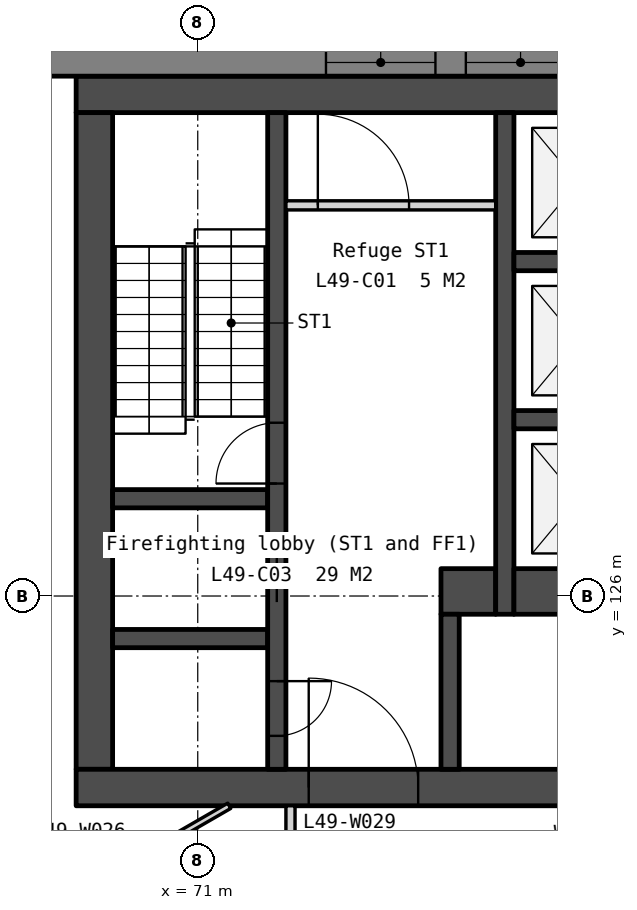
"""IFC4 building model, lengths in metres.
Left out: names, types, materials, properties, quantities, classifications, styles, units other than length and angle.
Written with IfcOpenShell. Run it as: python <this file> out.ifc"""

import sys

from ifc_helpers import new_model, si_unit, direction, frame, frame_2d, origin, place, context, subcontext, project, spatial, polyline, rectangle, outline, extrude, element, fill, save


model = new_model("IFC4")
c1 = context("Model", 3, precision=1e-05, world=origin(), true_north=direction((0.0, 1.0)))
c2 = subcontext(c1, "Body", "Model", "MODEL_VIEW")
j1 = project(units=[si_unit("LENGTHUNIT", "METRE"), si_unit("PLANEANGLEUNIT", "RADIAN")], contexts=[c1])
p1 = place(None, origin())
s1 = spatial("IfcSite", under=j1, at=p1, CompositionType="ELEMENT")
p2 = place(p1, origin())
s2 = spatial("IfcBuilding", under=s1, at=p2, CompositionType="ELEMENT")
p3 = place(p2, frame((0.0, 0.0, 195.8)))
s3 = spatial("IfcBuildingStorey", under=s2, at=p3, CompositionType="ELEMENT", Elevation=195.8)
p4 = place(p3, frame((69.0, 134.25, 0.0), z_axis=(0.0, 0.0, 1.0), x_axis=(1.0, 0.0, 0.0)))
e1 = element("IfcWall", 1, at=p4, inside=s3, PredefinedType="SOLIDWALL", context=c2, shape_type="SweptSolid", body=[
    extrude(rectangle(XDim=22.0, YDim=0.6, at=frame_2d((11.0, 0.0))), origin(), (0.0, 0.0, 1.0), 3.75),
])
p5 = place(p3, frame((69.3, 133.95, 0.0), z_axis=(0.0, 0.0, 1.0), x_axis=(0.0, -1.0, 0.0)))
e2 = element("IfcWall", 2, at=p5, inside=s3, PredefinedType="SOLIDWALL", context=c2, shape_type="SweptSolid", body=[
    extrude(rectangle(XDim=10.8, YDim=0.6, at=frame_2d((5.4, 0.0))), origin(), (0.0, 0.0, 1.0), 3.75),
])
p6 = place(p3, frame((69.0, 122.85, 0.0), z_axis=(0.0, 0.0, 1.0), x_axis=(1.0, 0.0, 0.0)))
e3 = element("IfcWall", 3, at=p6, inside=s3, PredefinedType="SOLIDWALL", context=c2, shape_type="SweptSolid", body=[
    extrude(rectangle(XDim=22.0, YDim=0.6, at=frame_2d((11.0, 0.0))), origin(), (0.0, 0.0, 1.0), 3.75),
])
p7 = place(p6, frame((16.375, 0.0, 0.0)))
e4 = element("IfcOpeningElement", 4, at=p7, cuts=e3, PredefinedType="OPENING", context=c2, shape_type="SweptSolid", body=[
    extrude(rectangle(XDim=1.8, YDim=2.1, at=frame_2d((0.9, 1.05))), frame((0.0, 0.31, 0.0), z_axis=(0.0, -1.0, 0.0), x_axis=(1.0, 0.0, 0.0)), (0.0, 0.0, 1.0), 0.62),
])
p8 = place(p6, frame((3.825, 0.0, 0.0)))
e5 = element("IfcOpeningElement", 5, at=p8, cuts=e3, PredefinedType="OPENING", context=c2, shape_type="SweptSolid", body=[
    extrude(rectangle(XDim=1.8, YDim=2.1, at=frame_2d((0.9, 1.05))), frame((0.0, 0.31, 0.0), z_axis=(0.0, -1.0, 0.0), x_axis=(1.0, 0.0, 0.0)), (0.0, 0.0, 1.0), 0.62),
])
p9 = place(p6, frame((12.85, 0.0, 0.0)))
e6 = element("IfcOpeningElement", 6, at=p9, cuts=e3, PredefinedType="OPENING", context=c2, shape_type="SweptSolid", body=[
    extrude(rectangle(XDim=1.5, YDim=2.1, at=frame_2d((0.75, 1.05))), frame((0.0, 0.31, 0.0), z_axis=(0.0, -1.0, 0.0), x_axis=(1.0, 0.0, 0.0)), (0.0, 0.0, 1.0), 0.62),
])
for number, where, z_axis, x_axis in (
    (7, (69.6, 127.6, 0.0), (0.0, 0.0, 1.0), (1.0, 0.0, 0.0)),
    (8, (69.6, 125.3, 0.0), (0.0, 0.0, 1.0), (1.0, 0.0, 0.0)),
):
    element("IfcWall", number, at=place(p3, frame(where, z_axis=z_axis, x_axis=x_axis)), inside=s3, PredefinedType="SOLIDWALL", context=c2, shape_type="SweptSolid", body=[
        extrude(rectangle(XDim=2.55, YDim=0.3, at=frame_2d((1.275, 0.0))), origin(), (0.0, 0.0, 1.0), 3.75),
    ])
p10 = place(p3, frame((72.3, 133.95, 0.0), z_axis=(0.0, 0.0, 1.0), x_axis=(0.0, -1.0, 0.0)))
e9 = element("IfcWall", 9, at=p10, inside=s3, PredefinedType="SOLIDWALL", context=c2, shape_type="SweptSolid", body=[
    extrude(rectangle(XDim=10.8, YDim=0.3, at=frame_2d((5.4, 0.0))), origin(), (0.0, 0.0, 1.0), 3.75),
])
p11 = place(p10, frame((6.95, 0.0, 0.0)))
e10 = element("IfcOpeningElement", 10, at=p11, cuts=e9, PredefinedType="OPENING", context=c2, shape_type="SweptSolid", body=[
    extrude(rectangle(XDim=1.1, YDim=2.1, at=frame_2d((0.55, 1.05))), frame((0.0, 0.16, 0.0), z_axis=(0.0, -1.0, 0.0), x_axis=(1.0, 0.0, 0.0)), (0.0, 0.0, 1.0), 0.32),
])
p12 = place(p10, frame((9.35, 0.0, 0.0)))
e11 = element("IfcOpeningElement", 11, at=p12, cuts=e9, PredefinedType="OPENING", context=c2, shape_type="SweptSolid", body=[
    extrude(rectangle(XDim=0.9, YDim=2.1, at=frame_2d((0.45, 1.05))), frame((0.0, 0.16, 0.0), z_axis=(0.0, -1.0, 0.0), x_axis=(1.0, 0.0, 0.0)), (0.0, 0.0, 1.0), 0.32),
])
p13 = place(p10, frame((5.1, 0.0, 0.0)))
e12 = element("IfcOpeningElement", 12, at=p13, cuts=e9, PredefinedType="OPENING", context=c2, shape_type="SweptSolid", body=[
    extrude(rectangle(XDim=1.0, YDim=2.1, at=frame_2d((0.5, 1.05))), frame((0.0, 0.16, 0.0), z_axis=(0.0, -1.0, 0.0), x_axis=(1.0, 0.0, 0.0)), (0.0, 0.0, 1.0), 0.32),
])
p14 = place(p3, frame((72.45, 132.425, 0.0), z_axis=(0.0, 0.0, 1.0), x_axis=(1.0, 0.0, 0.0)))
e13 = element("IfcWall", 13, at=p14, inside=s3, PredefinedType="PARTITIONING", context=c2, shape_type="SweptSolid", body=[
    extrude(rectangle(XDim=3.45, YDim=0.15, at=frame_2d((1.725, 0.0))), origin(), (0.0, 0.0, 1.0), 3.75),
])
p15 = place(p14, frame((0.525, 0.0, 0.0)))
e14 = element("IfcOpeningElement", 14, at=p15, cuts=e13, PredefinedType="OPENING", context=c2, shape_type="SweptSolid", body=[
    extrude(rectangle(XDim=1.5, YDim=2.1, at=frame_2d((0.75, 1.05))), frame((0.0, 0.085, 0.0), z_axis=(0.0, -1.0, 0.0), x_axis=(1.0, 0.0, 0.0)), (0.0, 0.0, 1.0), 0.17),
])
p16 = place(p3, frame((75.0, 126.075, 0.0), z_axis=(0.0, 0.0, 1.0), x_axis=(1.0, 0.0, 0.0)))
e15 = element("IfcWall", 15, at=p16, inside=s3, PredefinedType="SOLIDWALL", context=c2, shape_type="SweptSolid", body=[
    extrude(rectangle(XDim=0.9, YDim=0.75, at=frame_2d((0.45, 0.0))), origin(), (0.0, 0.0, 1.0), 3.75),
])
p17 = place(p3, frame((75.15, 125.7, 0.0), z_axis=(0.0, 0.0, 1.0), x_axis=(0.0, -1.0, 0.0)))
e16 = element("IfcWall", 16, at=p17, inside=s3, PredefinedType="SOLIDWALL", context=c2, shape_type="SweptSolid", body=[
    extrude(rectangle(XDim=2.55, YDim=0.3, at=frame_2d((1.275, 0.0))), origin(), (0.0, 0.0, 1.0), 3.75),
])
p18 = place(p3, frame((76.05, 133.95, 0.0), z_axis=(0.0, 0.0, 1.0), x_axis=(0.0, -1.0, 0.0)))
e17 = element("IfcWall", 17, at=p18, inside=s3, PredefinedType="SOLIDWALL", context=c2, shape_type="SweptSolid", body=[
    extrude(rectangle(XDim=8.25, YDim=0.3, at=frame_2d((4.125, 0.0))), origin(), (0.0, 0.0, 1.0), 3.75),
])
for number, where, z_axis, x_axis in (
    (18, (76.2, 131.5, 0.0), (0.0, 0.0, 1.0), (1.0, 0.0, 0.0)),
    (19, (76.2, 128.9, 0.0), (0.0, 0.0, 1.0), (1.0, 0.0, 0.0)),
):
    element("IfcWall", number, at=place(p3, frame(where, z_axis=z_axis, x_axis=x_axis)), inside=s3, PredefinedType="SOLIDWALL", context=c2, shape_type="SweptSolid", body=[
        extrude(rectangle(XDim=2.1, YDim=0.3, at=frame_2d((1.05, 0.0))), origin(), (0.0, 0.0, 1.0), 3.75),
    ])
p19 = place(p3, frame((76.2, 126.075, 0.0), z_axis=(0.0, 0.0, 1.0), x_axis=(1.0, 0.0, 0.0)))
e20 = element("IfcWall", 20, at=p19, inside=s3, PredefinedType="SOLIDWALL", context=c2, shape_type="SweptSolid", body=[
    extrude(rectangle(XDim=2.1, YDim=0.75, at=frame_2d((1.05, 0.0))), origin(), (0.0, 0.0, 1.0), 3.75),
])
p20 = place(p3, frame((99.365, 134.775, -0.15), z_axis=(0.0, 0.0, 1.0), x_axis=(-1.0, 0.0, 0.0)))
e21 = element("IfcWall", 21, at=p20, inside=s3, PredefinedType="SOLIDWALL", context=c2, shape_type="SweptSolid", body=[
    extrude(outline(polyline([(0.0, 0.0), (0.0, 3.9), (31.988, 3.9), (31.988, 0.0), (0.0, 0.0)])), frame((0.0, 0.225, 0.0), z_axis=(0.0, -1.0, 0.0), x_axis=(1.0, 0.0, 0.0)), (0.0, 0.0, 1.0), 0.45),
])
p21 = place(p20, frame((2.791, 0.0, 0.95)))
e22 = element("IfcOpeningElement", 22, at=p21, cuts=e21, PredefinedType="OPENING", context=c2, shape_type="SweptSolid", body=[
    extrude(rectangle(XDim=1.8, YDim=2.2, at=frame_2d((0.9, 1.1))), frame((0.0, 0.235, 0.0), z_axis=(0.0, -1.0, 0.0), x_axis=(1.0, 0.0, 0.0)), (0.0, 0.0, 1.0), 0.47),
])
p22 = place(p20, frame((5.091, 0.0, 0.95)))
e23 = element("IfcOpeningElement", 23, at=p22, cuts=e21, PredefinedType="OPENING", context=c2, shape_type="SweptSolid", body=[
    extrude(rectangle(XDim=1.8, YDim=2.2, at=frame_2d((0.9, 1.1))), frame((0.0, 0.235, 0.0), z_axis=(0.0, -1.0, 0.0), x_axis=(1.0, 0.0, 0.0)), (0.0, 0.0, 1.0), 0.47),
])
p23 = place(p20, frame((12.473, 0.0, 0.95)))
e24 = element("IfcOpeningElement", 24, at=p23, cuts=e21, PredefinedType="OPENING", context=c2, shape_type="SweptSolid", body=[
    extrude(rectangle(XDim=1.8, YDim=2.2, at=frame_2d((0.9, 1.1))), frame((0.0, 0.235, 0.0), z_axis=(0.0, -1.0, 0.0), x_axis=(1.0, 0.0, 0.0)), (0.0, 0.0, 1.0), 0.47),
])
p24 = place(p20, frame((14.773, 0.0, 0.95)))
e25 = element("IfcOpeningElement", 25, at=p24, cuts=e21, PredefinedType="OPENING", context=c2, shape_type="SweptSolid", body=[
    extrude(rectangle(XDim=1.8, YDim=2.2, at=frame_2d((0.9, 1.1))), frame((0.0, 0.235, 0.0), z_axis=(0.0, -1.0, 0.0), x_axis=(1.0, 0.0, 0.0)), (0.0, 0.0, 1.0), 0.47),
])
p25 = place(p20, frame((22.156, 0.0, 0.95)))
e26 = element("IfcOpeningElement", 26, at=p25, cuts=e21, PredefinedType="OPENING", context=c2, shape_type="SweptSolid", body=[
    extrude(rectangle(XDim=1.8, YDim=2.2, at=frame_2d((0.9, 1.1))), frame((0.0, 0.235, 0.0), z_axis=(0.0, -1.0, 0.0), x_axis=(1.0, 0.0, 0.0)), (0.0, 0.0, 1.0), 0.47),
])
p26 = place(p20, frame((24.456, 0.0, 0.95)))
e27 = element("IfcOpeningElement", 27, at=p26, cuts=e21, PredefinedType="OPENING", context=c2, shape_type="SweptSolid", body=[
    extrude(rectangle(XDim=1.8, YDim=2.2, at=frame_2d((0.9, 1.1))), frame((0.0, 0.235, 0.0), z_axis=(0.0, -1.0, 0.0), x_axis=(1.0, 0.0, 0.0)), (0.0, 0.0, 1.0), 0.47),
])
p27 = place(p3, frame((59.13, 132.168, -0.15), z_axis=(0.0, 0.0, 1.0), x_axis=(0.500002199942, -0.866024133644, 0.0)))
e28 = element("IfcWall", 28, at=p27, inside=s3, PredefinedType="SOLIDWALL", context=c2, shape_type="SweptSolid", body=[
    extrude(outline(polyline([(38.729, 0.0), (38.729, 3.9), (0.0, 3.9), (0.0, 0.0), (38.729, 0.0)])), frame((0.0, 0.225, 0.0), z_axis=(0.0, -1.0, 0.0), x_axis=(1.0, 0.0, 0.0)), (0.0, 0.0, 1.0), 0.45),
])
p28 = place(p27, frame((2.791, 0.0, 0.95)))
e29 = element("IfcOpeningElement", 29, at=p28, cuts=e28, PredefinedType="OPENING", context=c2, shape_type="SweptSolid", body=[
    extrude(rectangle(XDim=1.8, YDim=2.2, at=frame_2d((0.9, 1.1))), frame((0.0, 0.235, 0.0), z_axis=(0.0, -1.0, 0.0), x_axis=(1.0, 0.0, 0.0)), (0.0, 0.0, 1.0), 0.47),
])
p29 = place(p27, frame((5.091, 0.0, 0.95)))
e30 = element("IfcOpeningElement", 30, at=p29, cuts=e28, PredefinedType="OPENING", context=c2, shape_type="SweptSolid", body=[
    extrude(rectangle(XDim=1.8, YDim=2.2, at=frame_2d((0.9, 1.1))), frame((0.0, 0.235, 0.0), z_axis=(0.0, -1.0, 0.0), x_axis=(1.0, 0.0, 0.0)), (0.0, 0.0, 1.0), 0.47),
])
p30 = place(p27, frame((12.473, 0.0, 0.95)))
e31 = element("IfcOpeningElement", 31, at=p30, cuts=e28, PredefinedType="OPENING", context=c2, shape_type="SweptSolid", body=[
    extrude(rectangle(XDim=1.8, YDim=2.2, at=frame_2d((0.9, 1.1))), frame((0.0, 0.235, 0.0), z_axis=(0.0, -1.0, 0.0), x_axis=(1.0, 0.0, 0.0)), (0.0, 0.0, 1.0), 0.47),
])
p31 = place(p27, frame((14.773, 0.0, 0.95)))
e32 = element("IfcOpeningElement", 32, at=p31, cuts=e28, PredefinedType="OPENING", context=c2, shape_type="SweptSolid", body=[
    extrude(rectangle(XDim=1.8, YDim=2.2, at=frame_2d((0.9, 1.1))), frame((0.0, 0.235, 0.0), z_axis=(0.0, -1.0, 0.0), x_axis=(1.0, 0.0, 0.0)), (0.0, 0.0, 1.0), 0.47),
])
p32 = place(p27, frame((22.156, 0.0, 0.95)))
e33 = element("IfcOpeningElement", 33, at=p32, cuts=e28, PredefinedType="OPENING", context=c2, shape_type="SweptSolid", body=[
    extrude(rectangle(XDim=1.8, YDim=2.2, at=frame_2d((0.9, 1.1))), frame((0.0, 0.235, 0.0), z_axis=(0.0, -1.0, 0.0), x_axis=(1.0, 0.0, 0.0)), (0.0, 0.0, 1.0), 0.47),
])
p33 = place(p27, frame((24.456, 0.0, 0.95)))
e34 = element("IfcOpeningElement", 34, at=p33, cuts=e28, PredefinedType="OPENING", context=c2, shape_type="SweptSolid", body=[
    extrude(rectangle(XDim=1.8, YDim=2.2, at=frame_2d((0.9, 1.1))), frame((0.0, 0.235, 0.0), z_axis=(0.0, -1.0, 0.0), x_axis=(1.0, 0.0, 0.0)), (0.0, 0.0, 1.0), 0.47),
])
p34 = place(p27, frame((31.838, 0.0, 0.95)))
e35 = element("IfcOpeningElement", 35, at=p34, cuts=e28, PredefinedType="OPENING", context=c2, shape_type="SweptSolid", body=[
    extrude(rectangle(XDim=1.8, YDim=2.2, at=frame_2d((0.9, 1.1))), frame((0.0, 0.235, 0.0), z_axis=(0.0, -1.0, 0.0), x_axis=(1.0, 0.0, 0.0)), (0.0, 0.0, 1.0), 0.47),
])
p35 = place(p27, frame((34.138, 0.0, 0.95)))
e36 = element("IfcOpeningElement", 36, at=p35, cuts=e28, PredefinedType="OPENING", context=c2, shape_type="SweptSolid", body=[
    extrude(rectangle(XDim=1.8, YDim=2.2, at=frame_2d((0.9, 1.1))), frame((0.0, 0.235, 0.0), z_axis=(0.0, -1.0, 0.0), x_axis=(1.0, 0.0, 0.0)), (0.0, 0.0, 1.0), 0.47),
])
p36 = place(p3, frame((66.587, 119.703, 0.0), z_axis=(0.0, 0.0, 1.0), x_axis=(0.866023511746, 0.500003277092, 0.0)))
e37 = element("IfcWall", 37, at=p36, inside=s3, PredefinedType="PARTITIONING", context=c2, shape_type="SweptSolid", body=[
    extrude(rectangle(XDim=5.694, YDim=0.1, at=frame_2d((2.847, 0.0))), origin(), (0.0, 0.0, 1.0), 3.75),
])
p37 = place(p36, frame((2.397, 0.0, 0.0)))
e38 = element("IfcOpeningElement", 38, at=p37, cuts=e37, PredefinedType="OPENING", context=c2, shape_type="SweptSolid", body=[
    extrude(rectangle(XDim=0.9, YDim=2.1, at=frame_2d((0.45, 1.05))), frame((0.0, 0.06, 0.0), z_axis=(0.0, -1.0, 0.0), x_axis=(1.0, 0.0, 0.0)), (0.0, 0.0, 1.0), 0.12),
])
p38 = place(p3, frame((72.525, 120.05, 0.0), z_axis=(0.0, 0.0, 1.0), x_axis=(0.0, 1.0, 0.0)))
e39 = element("IfcWall", 39, at=p38, inside=s3, PredefinedType="PARTITIONING", context=c2, shape_type="SweptSolid", body=[
    extrude(rectangle(XDim=2.5, YDim=0.15, at=frame_2d((1.25, 0.0))), origin(), (0.0, 0.0, 1.0), 3.75),
])
p39 = place(p38, frame((0.75, 0.0, 0.0)))
e40 = element("IfcOpeningElement", 40, at=p39, cuts=e39, PredefinedType="OPENING", context=c2, shape_type="SweptSolid", body=[
    extrude(rectangle(XDim=1.0, YDim=2.1, at=frame_2d((0.5, 1.05))), frame((0.0, 0.085, 0.0), z_axis=(0.0, -1.0, 0.0), x_axis=(1.0, 0.0, 0.0)), (0.0, 0.0, 1.0), 0.17),
])
p40 = place(p11, origin())
e41 = element("IfcDoor", 41, at=p40, inside=s3, OperationType="SLIDING_TO_LEFT", PredefinedType="DOOR", context=c2, shape_type="SweptSolid", body=[
    extrude(rectangle(XDim=1.1, YDim=2.1, at=frame_2d((0.55, 1.05))), frame((0.0, 0.025, 0.0), z_axis=(0.0, -1.0, 0.0), x_axis=(1.0, 0.0, 0.0)), (0.0, 0.0, 1.0), 0.05),
])
fill(e10, e41)
p41 = place(p8, origin())
e42 = element("IfcDoor", 42, at=p41, inside=s3, OperationType="DOUBLE_DOOR_DOUBLE_SWING", PredefinedType="DOOR", context=c2, shape_type="SweptSolid", body=[
    extrude(rectangle(XDim=1.8, YDim=2.1, at=frame_2d((0.9, 1.05))), frame((0.0, 0.025, 0.0), z_axis=(0.0, -1.0, 0.0), x_axis=(1.0, 0.0, 0.0)), (0.0, 0.0, 1.0), 0.05),
])
fill(e5, e42)
p42 = place(p15, origin())
e43 = element("IfcDoor", 43, at=p42, inside=s3, OperationType="DOUBLE_DOOR_DOUBLE_SWING", PredefinedType="DOOR", context=c2, shape_type="SweptSolid", body=[
    extrude(rectangle(XDim=1.5, YDim=2.1, at=frame_2d((0.75, 1.05))), frame((0.0, 0.025, 0.0), z_axis=(0.0, -1.0, 0.0), x_axis=(1.0, 0.0, 0.0)), (0.0, 0.0, 1.0), 0.05),
])
fill(e14, e43)
p43 = place(p12, origin())
e44 = element("IfcDoor", 44, at=p43, inside=s3, OperationType="SINGLE_SWING_LEFT", PredefinedType="DOOR", context=c2, shape_type="SweptSolid", body=[
    extrude(rectangle(XDim=0.9, YDim=2.1, at=frame_2d((0.45, 1.05))), frame((0.0, 0.025, 0.0), z_axis=(0.0, -1.0, 0.0), x_axis=(1.0, 0.0, 0.0)), (0.0, 0.0, 1.0), 0.05),
])
fill(e11, e44)
p44 = place(p13, origin())
e45 = element("IfcDoor", 45, at=p44, inside=s3, OperationType="SINGLE_SWING_RIGHT", PredefinedType="DOOR", context=c2, shape_type="SweptSolid", body=[
    extrude(rectangle(XDim=1.0, YDim=2.1, at=frame_2d((0.5, 1.05))), frame((0.0, 0.025, 0.0), z_axis=(0.0, -1.0, 0.0), x_axis=(1.0, 0.0, 0.0)), (0.0, 0.0, 1.0), 0.05),
])
fill(e12, e45)
p45 = place(p25, origin())
e46 = element("IfcWindow", 46, at=p45, inside=s3, PartitioningType="SINGLE_PANEL", PredefinedType="WINDOW", context=c2, shape_type="SweptSolid", body=[
    extrude(rectangle(XDim=1.8, YDim=2.2, at=frame_2d((0.9, 1.1))), frame((0.0, 0.03, 0.0), z_axis=(0.0, -1.0, 0.0), x_axis=(1.0, 0.0, 0.0)), (0.0, 0.0, 1.0), 0.06),
])
fill(e26, e46)
p46 = place(p26, origin())
e47 = element("IfcWindow", 47, at=p46, inside=s3, PartitioningType="SINGLE_PANEL", PredefinedType="WINDOW", context=c2, shape_type="SweptSolid", body=[
    extrude(rectangle(XDim=1.8, YDim=2.2, at=frame_2d((0.9, 1.1))), frame((0.0, 0.03, 0.0), z_axis=(0.0, -1.0, 0.0), x_axis=(1.0, 0.0, 0.0)), (0.0, 0.0, 1.0), 0.06),
])
fill(e27, e47)
save(model, sys.argv[1])
